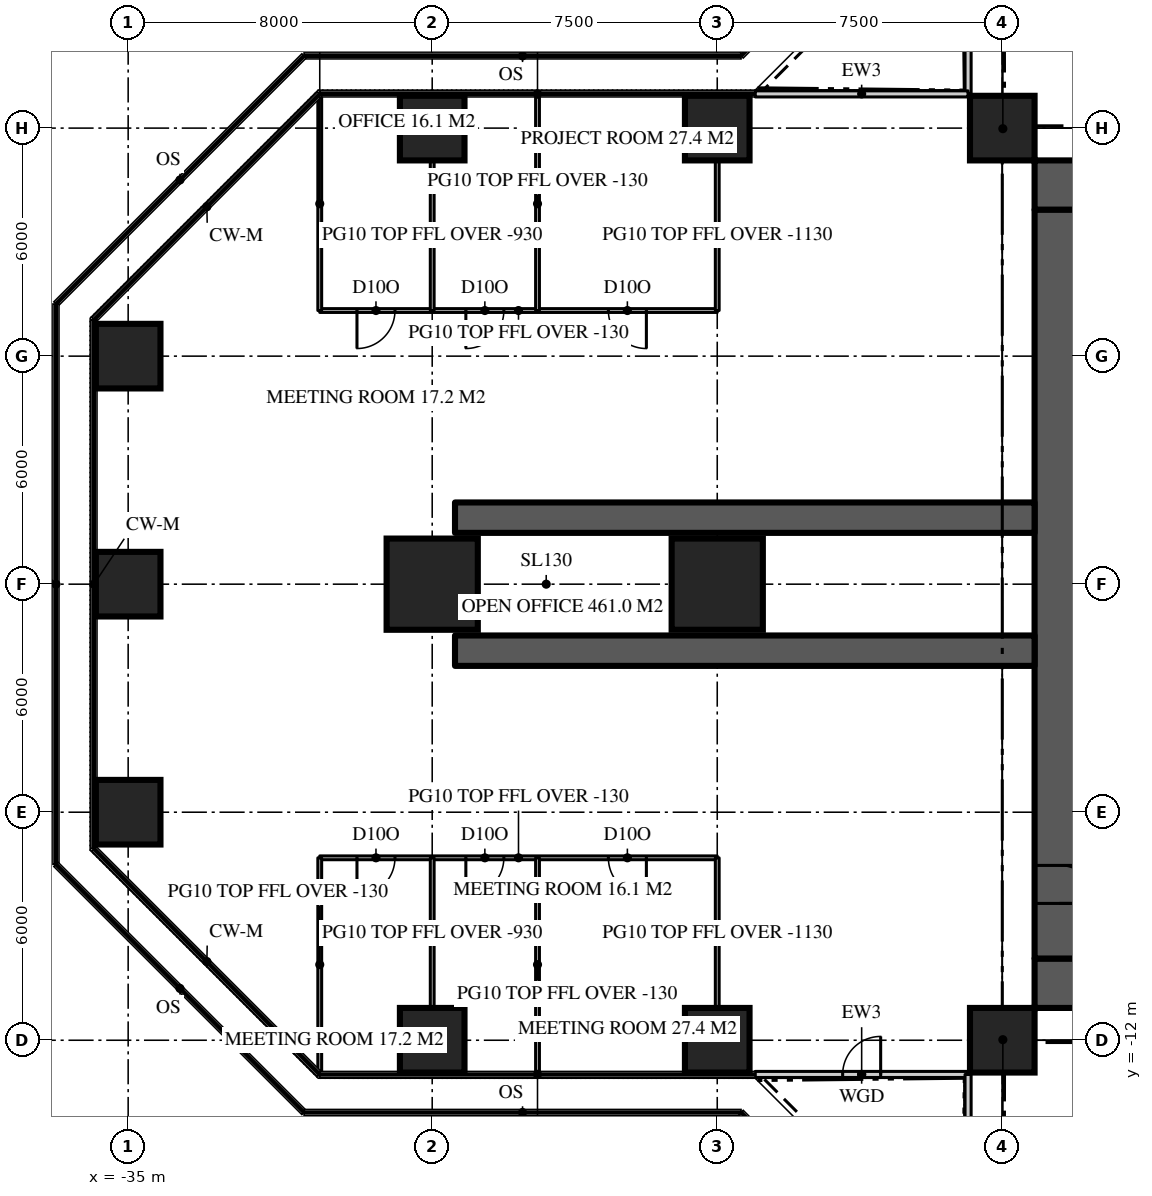
"""IFC4 building model, lengths in metres.
Left out: names, types, materials, properties, quantities, classifications, styles, units other than length and angle.
Written with IfcOpenShell. Run it as: python <this file> out.ifc"""

import sys

from ifc_helpers import new_model, si_unit, direction, frame, frame_2d, origin, origin_2d, place, context, subcontext, project, spatial, rectangle, extrude, element, fill, save


model = new_model("IFC4")
c1 = context("Model", 3, precision=1e-05, world=origin(), true_north=direction((0.0, 1.0)))
c2 = subcontext(c1, "Body", "Model", "MODEL_VIEW")
j1 = project(units=[si_unit("LENGTHUNIT", "METRE"), si_unit("PLANEANGLEUNIT", "RADIAN")], contexts=[c1])
p1 = place(None, origin())
s1 = spatial("IfcSite", under=j1, at=p1, CompositionType="ELEMENT")
p2 = place(p1, origin())
s2 = spatial("IfcBuilding", under=s1, at=p2, CompositionType="ELEMENT")
p3 = place(p2, frame((0.0, 0.0, 178.8)))
s3 = spatial("IfcBuildingStorey", under=s2, at=p3, CompositionType="ELEMENT", Elevation=178.8)
p4 = place(p3, frame((-11.15, 10.5, 0.0), z_axis=(0.0, 0.0, 1.0), x_axis=(1.0, 0.0, 0.0)))
e1 = element("IfcWall", 1, at=p4, inside=s3, PredefinedType="SHEAR", context=c2, shape_type="SweptSolid", body=[
    extrude(rectangle(XDim=22.3, YDim=1.3, at=frame_2d((11.15, 0.0))), origin(), (0.0, 0.0, 1.0), 3.9),
])
p5 = place(p4, frame((4.25, 0.0, 0.0)))
e2 = element("IfcOpeningElement", 2, at=p5, cuts=e1, PredefinedType="OPENING", context=c2, shape_type="SweptSolid", body=[
    extrude(rectangle(XDim=1.8, YDim=2.2, at=frame_2d((0.9, 1.1))), frame((0.0, 0.66, 0.0), z_axis=(0.0, -1.0, 0.0), x_axis=(1.0, 0.0, 0.0)), (0.0, 0.0, 1.0), 1.32),
])
p6 = place(p4, frame((16.25, 0.0, 0.0)))
e3 = element("IfcOpeningElement", 3, at=p6, cuts=e1, PredefinedType="OPENING", context=c2, shape_type="SweptSolid", body=[
    extrude(rectangle(XDim=1.8, YDim=2.2, at=frame_2d((0.9, 1.1))), frame((0.0, 0.66, 0.0), z_axis=(0.0, -1.0, 0.0), x_axis=(1.0, 0.0, 0.0)), (0.0, 0.0, 1.0), 1.32),
])
p7 = place(p3, frame((11.15, -10.5, 0.0), z_axis=(0.0, 0.0, 1.0), x_axis=(-1.0, 0.0, 0.0)))
e4 = element("IfcWall", 4, at=p7, inside=s3, PredefinedType="SHEAR", context=c2, shape_type="SweptSolid", body=[
    extrude(rectangle(XDim=22.3, YDim=1.3, at=frame_2d((11.15, 0.0))), origin(), (0.0, 0.0, 1.0), 3.9),
])
p8 = place(p7, frame((16.25, 0.0, 0.0)))
e5 = element("IfcOpeningElement", 5, at=p8, cuts=e4, PredefinedType="OPENING", context=c2, shape_type="SweptSolid", body=[
    extrude(rectangle(XDim=1.8, YDim=2.2, at=frame_2d((0.9, 1.1))), frame((0.0, 0.66, 0.0), z_axis=(0.0, -1.0, 0.0), x_axis=(1.0, 0.0, 0.0)), (0.0, 0.0, 1.0), 1.32),
])
p9 = place(p7, frame((4.25, 0.0, 0.0)))
e6 = element("IfcOpeningElement", 6, at=p9, cuts=e4, PredefinedType="OPENING", context=c2, shape_type="SweptSolid", body=[
    extrude(rectangle(XDim=1.8, YDim=2.2, at=frame_2d((0.9, 1.1))), frame((0.0, 0.66, 0.0), z_axis=(0.0, -1.0, 0.0), x_axis=(1.0, 0.0, 0.0)), (0.0, 0.0, 1.0), 1.32),
])
p10 = place(p3, frame((-10.5, 9.85, 0.0), z_axis=(0.0, 0.0, 1.0), x_axis=(0.0, -1.0, 0.0)))
e7 = element("IfcWall", 7, at=p10, inside=s3, PredefinedType="SHEAR", context=c2, shape_type="SweptSolid", body=[
    extrude(rectangle(XDim=19.7, YDim=1.3, at=frame_2d((9.85, 0.0))), origin(), (0.0, 0.0, 1.0), 3.9),
])
p11 = place(p10, frame((17.25, 0.0, 0.0)))
e8 = element("IfcOpeningElement", 8, at=p11, cuts=e7, PredefinedType="OPENING", context=c2, shape_type="SweptSolid", body=[
    extrude(rectangle(XDim=1.0, YDim=2.2, at=frame_2d((0.5, 1.1))), frame((0.0, 0.66, 0.0), z_axis=(0.0, -1.0, 0.0), x_axis=(1.0, 0.0, 0.0)), (0.0, 0.0, 1.0), 1.32),
])
for number, where, z_axis, x_axis in (
    (9, (-11.15, 1.75, 0.0), (0.0, 0.0, 1.0), (-1.0, 0.0, 0.0)),
    (10, (-11.15, -1.75, 0.0), (0.0, 0.0, 1.0), (-1.0, 0.0, 0.0)),
):
    element("IfcWall", number, at=place(p3, frame(where, z_axis=z_axis, x_axis=x_axis)), inside=s3, PredefinedType="SHEAR", context=c2, shape_type="SweptSolid", body=[
        extrude(rectangle(XDim=15.25, YDim=0.8, at=frame_2d((7.625, 0.0))), origin(), (0.0, 0.0, 1.0), 3.9),
    ])
for number, where, z_axis, x_axis in (
    (11, (-27.0, -12.0, 0.0), (0.0, 0.0, 1.0), (1.0, 0.0, 0.0)),
    (12, (-19.5, -12.0, 0.0), (0.0, 0.0, 1.0), (1.0, 0.0, 0.0)),
    (13, (-12.0, -12.0, 0.0), (0.0, 0.0, 1.0), (1.0, 0.0, 0.0)),
    (14, (-35.0, -6.0, 0.0), (0.0, 0.0, 1.0), (1.0, 0.0, 0.0)),
    (15, (-35.0, 0.0, 0.0), (0.0, 0.0, 1.0), (1.0, 0.0, 0.0)),
):
    element("IfcColumn", number, at=place(p3, frame(where, z_axis=z_axis, x_axis=x_axis)), inside=s3, PredefinedType="COLUMN", context=c2, shape_type="SweptSolid", body=[
        extrude(rectangle(XDim=1.7, YDim=1.7, at=origin_2d()), origin(), (0.0, 0.0, 1.0), 3.9),
    ])
for number, where, z_axis, x_axis in (
    (16, (-27.0, 0.0, 0.0), (0.0, 0.0, 1.0), (1.0, 0.0, 0.0)),
    (17, (-19.5, 0.0, 0.0), (0.0, 0.0, 1.0), (1.0, 0.0, 0.0)),
):
    element("IfcColumn", number, at=place(p3, frame(where, z_axis=z_axis, x_axis=x_axis)), inside=s3, PredefinedType="COLUMN", context=c2, shape_type="SweptSolid", body=[
        extrude(rectangle(XDim=2.4, YDim=2.4, at=origin_2d()), origin(), (0.0, 0.0, 1.0), 3.9),
    ])
for number, where, z_axis, x_axis in (
    (18, (-35.0, 6.0, 0.0), (0.0, 0.0, 1.0), (1.0, 0.0, 0.0)),
    (19, (-27.0, 12.0, 0.0), (0.0, 0.0, 1.0), (1.0, 0.0, 0.0)),
    (20, (-19.5, 12.0, 0.0), (0.0, 0.0, 1.0), (1.0, 0.0, 0.0)),
    (21, (-12.0, 12.0, 0.0), (0.0, 0.0, 1.0), (1.0, 0.0, 0.0)),
):
    element("IfcColumn", number, at=place(p3, frame(where, z_axis=z_axis, x_axis=x_axis)), inside=s3, PredefinedType="COLUMN", context=c2, shape_type="SweptSolid", body=[
        extrude(rectangle(XDim=1.7, YDim=1.7, at=origin_2d()), origin(), (0.0, 0.0, 1.0), 3.9),
    ])
p12 = place(p3, frame((-12.9, 18.5, 0.0), z_axis=(0.0, 0.0, 1.0), x_axis=(0.0, -1.0, 0.0)))
e22 = element("IfcWall", 22, at=p12, inside=s3, PredefinedType="SOLIDWALL", context=c2, shape_type="SweptSolid", body=[
    extrude(rectangle(XDim=5.6, YDim=0.16, at=frame_2d((2.8, 0.0))), origin(), (0.0, 0.0, 1.0), 3.77),
])
p13 = place(p12, frame((2.3, 0.0, 0.0)))
e23 = element("IfcOpeningElement", 23, at=p13, cuts=e22, PredefinedType="OPENING", context=c2, shape_type="SweptSolid", body=[
    extrude(rectangle(XDim=1.0, YDim=2.2, at=frame_2d((0.5, 1.1))), frame((0.0, 0.09, 0.0), z_axis=(0.0, -1.0, 0.0), x_axis=(1.0, 0.0, 0.0)), (0.0, 0.0, 1.0), 0.18),
])
p14 = place(p3, frame((-12.9, 12.9, 0.0), z_axis=(0.0, 0.0, 1.0), x_axis=(-1.0, 0.0, 0.0)))
e24 = element("IfcWall", 24, at=p14, inside=s3, PredefinedType="SOLIDWALL", context=c2, shape_type="SweptSolid", body=[
    extrude(rectangle(XDim=5.6, YDim=0.16, at=frame_2d((2.8, 0.0))), origin(), (0.0, 0.0, 1.0), 3.77),
])
p15 = place(p3, frame((-18.5, -12.9, 0.0), z_axis=(0.0, 0.0, 1.0), x_axis=(1.0, 0.0, 0.0)))
e25 = element("IfcWall", 25, at=p15, inside=s3, PredefinedType="SOLIDWALL", context=c2, shape_type="SweptSolid", body=[
    extrude(rectangle(XDim=5.6, YDim=0.16, at=frame_2d((2.8, 0.0))), origin(), (0.0, 0.0, 1.0), 3.77),
])
p16 = place(p15, frame((2.3, 0.0, 0.0)))
e26 = element("IfcOpeningElement", 26, at=p16, cuts=e25, PredefinedType="OPENING", context=c2, shape_type="SweptSolid", body=[
    extrude(rectangle(XDim=1.0, YDim=2.2, at=frame_2d((0.5, 1.1))), frame((0.0, 0.09, 0.0), z_axis=(0.0, -1.0, 0.0), x_axis=(1.0, 0.0, 0.0)), (0.0, 0.0, 1.0), 0.18),
])
p17 = place(p3, frame((-12.9, -12.9, 0.0), z_axis=(0.0, 0.0, 1.0), x_axis=(0.0, -1.0, 0.0)))
e27 = element("IfcWall", 27, at=p17, inside=s3, PredefinedType="SOLIDWALL", context=c2, shape_type="SweptSolid", body=[
    extrude(rectangle(XDim=5.6, YDim=0.16, at=frame_2d((2.8, 0.0))), origin(), (0.0, 0.0, 1.0), 3.77),
])
p18 = place(p3, frame((-19.5, -7.2, 0.0), z_axis=(0.0, 0.0, 1.0), x_axis=(-1.0, 0.0, 0.0)))
e28 = element("IfcWall", 28, at=p18, inside=s3, PredefinedType="PARTITIONING", context=c2, shape_type="SweptSolid", body=[
    extrude(rectangle(XDim=10.459, YDim=0.1, at=frame_2d((5.229, 0.0))), origin(), (0.0, 0.0, 1.0), 3.77),
])
p19 = place(p18, frame((1.865, 0.0, 0.0)))
e29 = element("IfcOpeningElement", 29, at=p19, cuts=e28, PredefinedType="OPENING", context=c2, shape_type="SweptSolid", body=[
    extrude(rectangle(XDim=1.0, YDim=2.2, at=frame_2d((0.5, 1.1))), frame((0.0, 0.06, 0.0), z_axis=(0.0, -1.0, 0.0), x_axis=(1.0, 0.0, 0.0)), (0.0, 0.0, 1.0), 0.12),
])
p20 = place(p18, frame((5.615, 0.0, 0.0)))
e30 = element("IfcOpeningElement", 30, at=p20, cuts=e28, PredefinedType="OPENING", context=c2, shape_type="SweptSolid", body=[
    extrude(rectangle(XDim=1.0, YDim=2.2, at=frame_2d((0.5, 1.1))), frame((0.0, 0.06, 0.0), z_axis=(0.0, -1.0, 0.0), x_axis=(1.0, 0.0, 0.0)), (0.0, 0.0, 1.0), 0.12),
])
p21 = place(p18, frame((8.479, 0.0, 0.0)))
e31 = element("IfcOpeningElement", 31, at=p21, cuts=e28, PredefinedType="OPENING", context=c2, shape_type="SweptSolid", body=[
    extrude(rectangle(XDim=1.0, YDim=2.2, at=frame_2d((0.5, 1.1))), frame((0.0, 0.06, 0.0), z_axis=(0.0, -1.0, 0.0), x_axis=(1.0, 0.0, 0.0)), (0.0, 0.0, 1.0), 0.12),
])
p22 = place(p3, frame((-19.5, -7.2, 0.0), z_axis=(0.0, 0.0, 1.0), x_axis=(0.0, -1.0, 0.0)))
e32 = element("IfcWall", 32, at=p22, inside=s3, PredefinedType="PARTITIONING", context=c2, shape_type="SweptSolid", body=[
    extrude(rectangle(XDim=3.95, YDim=0.1, at=frame_2d((1.975, 0.0))), origin(), (0.0, 0.0, 1.0), 2.77),
])
p23 = place(p3, frame((-24.229, -7.2, 0.0), z_axis=(0.0, 0.0, 1.0), x_axis=(0.0, -1.0, 0.0)))
e33 = element("IfcWall", 33, at=p23, inside=s3, PredefinedType="PARTITIONING", context=c2, shape_type="SweptSolid", body=[
    extrude(rectangle(XDim=5.62, YDim=0.1, at=frame_2d((2.81, 0.0))), origin(), (0.0, 0.0, 1.0), 3.77),
])
p24 = place(p3, frame((-27.0, -7.2, 0.0), z_axis=(0.0, 0.0, 1.0), x_axis=(0.0, -1.0, 0.0)))
e34 = element("IfcWall", 34, at=p24, inside=s3, PredefinedType="PARTITIONING", context=c2, shape_type="SweptSolid", body=[
    extrude(rectangle(XDim=3.95, YDim=0.1, at=frame_2d((1.975, 0.0))), origin(), (0.0, 0.0, 1.0), 2.97),
])
p25 = place(p3, frame((-29.959, -7.2, 0.0), z_axis=(0.0, 0.0, 1.0), x_axis=(0.0, -1.0, 0.0)))
e35 = element("IfcWall", 35, at=p25, inside=s3, PredefinedType="PARTITIONING", context=c2, shape_type="SweptSolid", body=[
    extrude(rectangle(XDim=5.62, YDim=0.1, at=frame_2d((2.81, 0.0))), origin(), (0.0, 0.0, 1.0), 3.77),
])
p26 = place(p3, frame((-19.5, 7.2, 0.0), z_axis=(0.0, 0.0, 1.0), x_axis=(-1.0, 0.0, 0.0)))
e36 = element("IfcWall", 36, at=p26, inside=s3, PredefinedType="PARTITIONING", context=c2, shape_type="SweptSolid", body=[
    extrude(rectangle(XDim=10.459, YDim=0.1, at=frame_2d((5.229, 0.0))), origin(), (0.0, 0.0, 1.0), 3.77),
])
p27 = place(p26, frame((1.865, 0.0, 0.0)))
e37 = element("IfcOpeningElement", 37, at=p27, cuts=e36, PredefinedType="OPENING", context=c2, shape_type="SweptSolid", body=[
    extrude(rectangle(XDim=1.0, YDim=2.2, at=frame_2d((0.5, 1.1))), frame((0.0, 0.06, 0.0), z_axis=(0.0, -1.0, 0.0), x_axis=(1.0, 0.0, 0.0)), (0.0, 0.0, 1.0), 0.12),
])
p28 = place(p26, frame((5.615, 0.0, 0.0)))
e38 = element("IfcOpeningElement", 38, at=p28, cuts=e36, PredefinedType="OPENING", context=c2, shape_type="SweptSolid", body=[
    extrude(rectangle(XDim=1.0, YDim=2.2, at=frame_2d((0.5, 1.1))), frame((0.0, 0.06, 0.0), z_axis=(0.0, -1.0, 0.0), x_axis=(1.0, 0.0, 0.0)), (0.0, 0.0, 1.0), 0.12),
])
p29 = place(p26, frame((8.479, 0.0, 0.0)))
e39 = element("IfcOpeningElement", 39, at=p29, cuts=e36, PredefinedType="OPENING", context=c2, shape_type="SweptSolid", body=[
    extrude(rectangle(XDim=1.0, YDim=2.2, at=frame_2d((0.5, 1.1))), frame((0.0, 0.06, 0.0), z_axis=(0.0, -1.0, 0.0), x_axis=(1.0, 0.0, 0.0)), (0.0, 0.0, 1.0), 0.12),
])
p30 = place(p3, frame((-19.5, 7.2, 0.0), z_axis=(0.0, 0.0, 1.0), x_axis=(0.0, 1.0, 0.0)))
e40 = element("IfcWall", 40, at=p30, inside=s3, PredefinedType="PARTITIONING", context=c2, shape_type="SweptSolid", body=[
    extrude(rectangle(XDim=3.95, YDim=0.1, at=frame_2d((1.975, 0.0))), origin(), (0.0, 0.0, 1.0), 2.77),
])
p31 = place(p3, frame((-24.229, 7.2, 0.0), z_axis=(0.0, 0.0, 1.0), x_axis=(0.0, 1.0, 0.0)))
e41 = element("IfcWall", 41, at=p31, inside=s3, PredefinedType="PARTITIONING", context=c2, shape_type="SweptSolid", body=[
    extrude(rectangle(XDim=5.62, YDim=0.1, at=frame_2d((2.81, 0.0))), origin(), (0.0, 0.0, 1.0), 3.77),
])
p32 = place(p3, frame((-27.0, 7.2, 0.0), z_axis=(0.0, 0.0, 1.0), x_axis=(0.0, 1.0, 0.0)))
e42 = element("IfcWall", 42, at=p32, inside=s3, PredefinedType="PARTITIONING", context=c2, shape_type="SweptSolid", body=[
    extrude(rectangle(XDim=3.95, YDim=0.1, at=frame_2d((1.975, 0.0))), origin(), (0.0, 0.0, 1.0), 2.97),
])
p33 = place(p3, frame((-29.959, 7.2, 0.0), z_axis=(0.0, 0.0, 1.0), x_axis=(0.0, 1.0, 0.0)))
e43 = element("IfcWall", 43, at=p33, inside=s3, PredefinedType="PARTITIONING", context=c2, shape_type="SweptSolid", body=[
    extrude(rectangle(XDim=5.62, YDim=0.1, at=frame_2d((2.81, 0.0))), origin(), (0.0, 0.0, 1.0), 3.77),
])
for number, where, z_axis, x_axis in (
    (44, (-11.15, 11.15, 0.0), (0.0, 0.0, 1.0), (-0.707, 0.707, 0.0)),
    (45, (-11.15, -11.15, 0.0), (0.0, 0.0, 1.0), (-0.707, -0.707, 0.0)),
):
    element("IfcWall", number, at=place(p3, frame(where, z_axis=z_axis, x_axis=x_axis)), inside=s3, PredefinedType="PARTITIONING", context=c2, shape_type="SweptSolid", body=[
        extrude(rectangle(XDim=2.362, YDim=0.15, at=frame_2d((1.181, 0.0))), origin(), (0.0, 0.0, 1.0), 3.22),
    ])
p34 = place(p16, origin())
e46 = element("IfcDoor", 46, at=p34, inside=s3, OperationType="SINGLE_SWING_RIGHT", PredefinedType="DOOR", context=c2, shape_type="SweptSolid", body=[
    extrude(rectangle(XDim=1.0, YDim=2.2, at=frame_2d((0.5, 1.1))), frame((0.0, 0.025, 0.0), z_axis=(0.0, -1.0, 0.0), x_axis=(1.0, 0.0, 0.0)), (0.0, 0.0, 1.0), 0.05),
])
fill(e26, e46)
p35 = place(p11, origin())
e47 = element("IfcDoor", 47, at=p35, inside=s3, OperationType="SINGLE_SWING_RIGHT", PredefinedType="DOOR", context=c2, shape_type="SweptSolid", body=[
    extrude(rectangle(XDim=1.0, YDim=2.2, at=frame_2d((0.5, 1.1))), frame((0.0, 0.025, 0.0), z_axis=(0.0, -1.0, 0.0), x_axis=(1.0, 0.0, 0.0)), (0.0, 0.0, 1.0), 0.05),
])
fill(e8, e47)
p36 = place(p19, origin())
e48 = element("IfcDoor", 48, at=p36, inside=s3, OperationType="SINGLE_SWING_LEFT", PredefinedType="DOOR", context=c2, shape_type="SweptSolid", body=[
    extrude(rectangle(XDim=1.0, YDim=2.2, at=frame_2d((0.5, 1.1))), frame((0.0, 0.025, 0.0), z_axis=(0.0, -1.0, 0.0), x_axis=(1.0, 0.0, 0.0)), (0.0, 0.0, 1.0), 0.05),
])
fill(e29, e48)
p37 = place(p20, origin())
e49 = element("IfcDoor", 49, at=p37, inside=s3, OperationType="SINGLE_SWING_RIGHT", PredefinedType="DOOR", context=c2, shape_type="SweptSolid", body=[
    extrude(rectangle(XDim=1.0, YDim=2.2, at=frame_2d((0.5, 1.1))), frame((0.0, 0.025, 0.0), z_axis=(0.0, -1.0, 0.0), x_axis=(1.0, 0.0, 0.0)), (0.0, 0.0, 1.0), 0.05),
])
fill(e30, e49)
p38 = place(p21, origin())
e50 = element("IfcDoor", 50, at=p38, inside=s3, OperationType="SINGLE_SWING_RIGHT", PredefinedType="DOOR", context=c2, shape_type="SweptSolid", body=[
    extrude(rectangle(XDim=1.0, YDim=2.2, at=frame_2d((0.5, 1.1))), frame((0.0, 0.025, 0.0), z_axis=(0.0, -1.0, 0.0), x_axis=(1.0, 0.0, 0.0)), (0.0, 0.0, 1.0), 0.05),
])
fill(e31, e50)
p39 = place(p27, origin())
e51 = element("IfcDoor", 51, at=p39, inside=s3, OperationType="SINGLE_SWING_LEFT", PredefinedType="DOOR", context=c2, shape_type="SweptSolid", body=[
    extrude(rectangle(XDim=1.0, YDim=2.2, at=frame_2d((0.5, 1.1))), frame((0.0, 0.025, 0.0), z_axis=(0.0, -1.0, 0.0), x_axis=(1.0, 0.0, 0.0)), (0.0, 0.0, 1.0), 0.05),
])
fill(e37, e51)
p40 = place(p28, origin())
e52 = element("IfcDoor", 52, at=p40, inside=s3, OperationType="SINGLE_SWING_RIGHT", PredefinedType="DOOR", context=c2, shape_type="SweptSolid", body=[
    extrude(rectangle(XDim=1.0, YDim=2.2, at=frame_2d((0.5, 1.1))), frame((0.0, 0.025, 0.0), z_axis=(0.0, -1.0, 0.0), x_axis=(1.0, 0.0, 0.0)), (0.0, 0.0, 1.0), 0.05),
])
fill(e38, e52)
p41 = place(p29, origin())
e53 = element("IfcDoor", 53, at=p41, inside=s3, OperationType="SINGLE_SWING_RIGHT", PredefinedType="DOOR", context=c2, shape_type="SweptSolid", body=[
    extrude(rectangle(XDim=1.0, YDim=2.2, at=frame_2d((0.5, 1.1))), frame((0.0, 0.025, 0.0), z_axis=(0.0, -1.0, 0.0), x_axis=(1.0, 0.0, 0.0)), (0.0, 0.0, 1.0), 0.05),
])
fill(e39, e53)
save(model, sys.argv[1])
